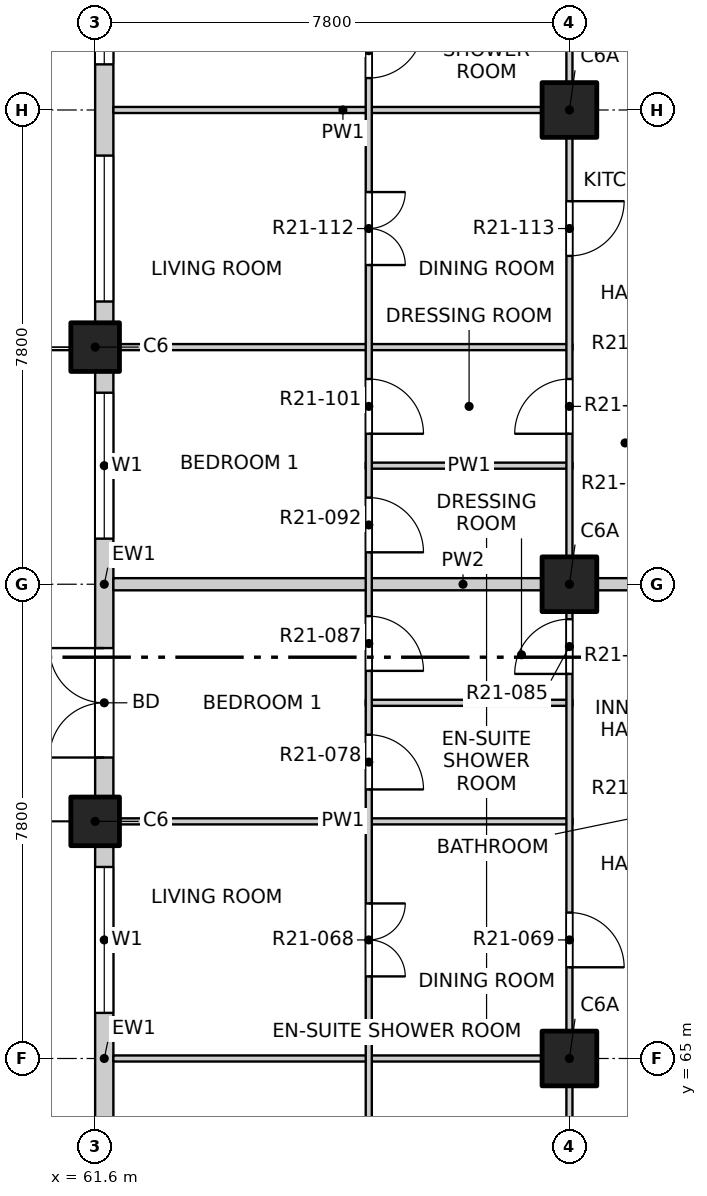
"""IFC4 building model, lengths in metres.
Left out: names, types, materials, properties, quantities, classifications, styles, units other than length and angle.
Written with IfcOpenShell. Run it as: python <this file> out.ifc"""

import sys

from ifc_helpers import new_model, si_unit, direction, frame, frame_2d, origin, origin_2d, place, context, subcontext, project, spatial, rectangle, extrude, element, fill, save


model = new_model("IFC4")
c1 = context("Model", 3, precision=1e-05, world=origin(), true_north=direction((0.0, 1.0)))
c2 = subcontext(c1, "Body", "Model", "MODEL_VIEW")
j1 = project(units=[si_unit("LENGTHUNIT", "METRE"), si_unit("PLANEANGLEUNIT", "RADIAN")], contexts=[c1])
p1 = place(None, origin())
s1 = spatial("IfcSite", under=j1, at=p1, CompositionType="ELEMENT")
p2 = place(p1, origin())
s2 = spatial("IfcBuilding", under=s1, at=p2, CompositionType="ELEMENT")
p3 = place(p2, frame((0.0, 0.0, 214.3)))
s3 = spatial("IfcBuildingStorey", under=s2, at=p3, CompositionType="ELEMENT", Elevation=214.3)
for number, where, z_axis, x_axis in (
    (1, (61.6, 68.9, -0.25), (0.0, 0.0, 1.0), (1.0, 0.0, 0.0)),
    (2, (61.6, 76.7, -0.25), (0.0, 0.0, 1.0), (1.0, 0.0, 0.0)),
):
    element("IfcColumn", number, at=place(p3, frame(where, z_axis=z_axis, x_axis=x_axis)), inside=s3, PredefinedType="COLUMN", context=c2, shape_type="SweptSolid", body=[
        extrude(rectangle(XDim=0.8, YDim=0.8, at=origin_2d()), origin(), (0.0, 0.0, 1.0), 3.4),
    ])
for number, where, z_axis, x_axis in (
    (3, (69.4, 65.0, -0.25), (0.0, 0.0, 1.0), (1.0, 0.0, 0.0)),
    (4, (69.4, 72.8, -0.25), (0.0, 0.0, 1.0), (1.0, 0.0, 0.0)),
    (5, (69.4, 80.6, -0.25), (0.0, 0.0, 1.0), (1.0, 0.0, 0.0)),
):
    element("IfcColumn", number, at=place(p3, frame(where, z_axis=z_axis, x_axis=x_axis)), inside=s3, PredefinedType="COLUMN", context=c2, shape_type="SweptSolid", body=[
        extrude(rectangle(XDim=0.9, YDim=0.9, at=origin_2d()), origin(), (0.0, 0.0, 1.0), 3.4),
    ])
p4 = place(p3, frame((61.75, 61.5, 0.0), z_axis=(0.0, 0.0, 1.0), x_axis=(0.0, 1.0, 0.0)))
e6 = element("IfcWall", 6, at=p4, inside=s3, PredefinedType="SOLIDWALL", context=c2, shape_type="SweptSolid", body=[
    extrude(rectangle(XDim=7.0, YDim=0.3, at=frame_2d((3.5, 0.0))), origin(), (0.0, 0.0, 1.0), 2.7),
])
p5 = place(p4, frame((0.65, 0.0, 0.0)))
e7 = element("IfcOpeningElement", 7, at=p5, cuts=e6, PredefinedType="OPENING", context=c2, shape_type="SweptSolid", body=[
    extrude(rectangle(XDim=1.8, YDim=2.4, at=frame_2d((0.9, 1.2))), frame((0.0, 0.16, 0.0), z_axis=(0.0, -1.0, 0.0), x_axis=(1.0, 0.0, 0.0)), (0.0, 0.0, 1.0), 0.32),
])
p6 = place(p4, frame((4.25, 0.0, 0.9)))
e8 = element("IfcOpeningElement", 8, at=p6, cuts=e6, PredefinedType="OPENING", context=c2, shape_type="SweptSolid", body=[
    extrude(rectangle(XDim=2.4, YDim=1.8, at=frame_2d((1.2, 0.9))), frame((0.0, 0.16, 0.0), z_axis=(0.0, -1.0, 0.0), x_axis=(1.0, 0.0, 0.0)), (0.0, 0.0, 1.0), 0.32),
])
p7 = place(p3, frame((61.75, 69.3, 0.0), z_axis=(0.0, 0.0, 1.0), x_axis=(0.0, 1.0, 0.0)))
e9 = element("IfcWall", 9, at=p7, inside=s3, PredefinedType="SOLIDWALL", context=c2, shape_type="SweptSolid", body=[
    extrude(rectangle(XDim=7.0, YDim=0.3, at=frame_2d((3.5, 0.0))), origin(), (0.0, 0.0, 1.0), 2.7),
])
p8 = place(p7, frame((0.65, 0.0, 0.0)))
e10 = element("IfcOpeningElement", 10, at=p8, cuts=e9, PredefinedType="OPENING", context=c2, shape_type="SweptSolid", body=[
    extrude(rectangle(XDim=1.8, YDim=2.4, at=frame_2d((0.9, 1.2))), frame((0.0, 0.16, 0.0), z_axis=(0.0, -1.0, 0.0), x_axis=(1.0, 0.0, 0.0)), (0.0, 0.0, 1.0), 0.32),
])
p9 = place(p7, frame((4.25, 0.0, 0.9)))
e11 = element("IfcOpeningElement", 11, at=p9, cuts=e9, PredefinedType="OPENING", context=c2, shape_type="SweptSolid", body=[
    extrude(rectangle(XDim=2.4, YDim=1.8, at=frame_2d((1.2, 0.9))), frame((0.0, 0.16, 0.0), z_axis=(0.0, -1.0, 0.0), x_axis=(1.0, 0.0, 0.0)), (0.0, 0.0, 1.0), 0.32),
])
p10 = place(p3, frame((61.75, 77.1, 0.0), z_axis=(0.0, 0.0, 1.0), x_axis=(0.0, 1.0, 0.0)))
e12 = element("IfcWall", 12, at=p10, inside=s3, PredefinedType="SOLIDWALL", context=c2, shape_type="SweptSolid", body=[
    extrude(rectangle(XDim=7.4, YDim=0.3, at=frame_2d((3.7, 0.0))), origin(), (0.0, 0.0, 1.0), 2.7),
])
p11 = place(p10, frame((0.35, 0.0, 0.9)))
e13 = element("IfcOpeningElement", 13, at=p11, cuts=e12, PredefinedType="OPENING", context=c2, shape_type="SweptSolid", body=[
    extrude(rectangle(XDim=2.4, YDim=1.8, at=frame_2d((1.2, 0.9))), frame((0.0, 0.16, 0.0), z_axis=(0.0, -1.0, 0.0), x_axis=(1.0, 0.0, 0.0)), (0.0, 0.0, 1.0), 0.32),
])
p12 = place(p10, frame((4.25, 0.0, 0.9)))
e14 = element("IfcOpeningElement", 14, at=p12, cuts=e12, PredefinedType="OPENING", context=c2, shape_type="SweptSolid", body=[
    extrude(rectangle(XDim=2.4, YDim=1.8, at=frame_2d((1.2, 0.9))), frame((0.0, 0.16, 0.0), z_axis=(0.0, -1.0, 0.0), x_axis=(1.0, 0.0, 0.0)), (0.0, 0.0, 1.0), 0.32),
])
p13 = place(p3, frame((61.9, 65.0, 0.0), z_axis=(0.0, 0.0, 1.0), x_axis=(1.0, 0.0, 0.0)))
e15 = element("IfcWall", 15, at=p13, inside=s3, PredefinedType="PARTITIONING", context=c2, shape_type="SweptSolid", body=[
    extrude(rectangle(XDim=7.55, YDim=0.1, at=frame_2d((3.775, 0.0))), origin(), (0.0, 0.0, 1.0), 3.15),
])
p14 = place(p3, frame((61.9, 68.9, 0.0), z_axis=(0.0, 0.0, 1.0), x_axis=(1.0, 0.0, 0.0)))
e16 = element("IfcWall", 16, at=p14, inside=s3, PredefinedType="PARTITIONING", context=c2, shape_type="SweptSolid", body=[
    extrude(rectangle(XDim=7.55, YDim=0.1, at=frame_2d((3.775, 0.0))), origin(), (0.0, 0.0, 1.0), 2.55),
])
p15 = place(p3, frame((66.05, 70.85, 0.0), z_axis=(0.0, 0.0, 1.0), x_axis=(1.0, 0.0, 0.0)))
e17 = element("IfcWall", 17, at=p15, inside=s3, PredefinedType="PARTITIONING", context=c2, shape_type="SweptSolid", body=[
    extrude(rectangle(XDim=3.4, YDim=0.1, at=frame_2d((1.7, 0.0))), origin(), (0.0, 0.0, 1.0), 3.15),
])
p16 = place(p3, frame((61.9, 72.8, 0.0), z_axis=(0.0, 0.0, 1.0), x_axis=(1.0, 0.0, 0.0)))
e18 = element("IfcWall", 18, at=p16, inside=s3, PredefinedType="PARTITIONING", context=c2, shape_type="SweptSolid", body=[
    extrude(rectangle(XDim=11.5, YDim=0.2, at=frame_2d((5.75, 0.0))), origin(), (0.0, 0.0, 1.0), 3.15),
])
p17 = place(p3, frame((66.05, 74.75, 0.0), z_axis=(0.0, 0.0, 1.0), x_axis=(1.0, 0.0, 0.0)))
e19 = element("IfcWall", 19, at=p17, inside=s3, PredefinedType="PARTITIONING", context=c2, shape_type="SweptSolid", body=[
    extrude(rectangle(XDim=3.4, YDim=0.1, at=frame_2d((1.7, 0.0))), origin(), (0.0, 0.0, 1.0), 3.15),
])
p18 = place(p3, frame((61.9, 76.7, 0.0), z_axis=(0.0, 0.0, 1.0), x_axis=(1.0, 0.0, 0.0)))
e20 = element("IfcWall", 20, at=p18, inside=s3, PredefinedType="PARTITIONING", context=c2, shape_type="SweptSolid", body=[
    extrude(rectangle(XDim=7.55, YDim=0.1, at=frame_2d((3.775, 0.0))), origin(), (0.0, 0.0, 1.0), 2.55),
])
p19 = place(p3, frame((61.9, 80.6, 0.0), z_axis=(0.0, 0.0, 1.0), x_axis=(1.0, 0.0, 0.0)))
e21 = element("IfcWall", 21, at=p19, inside=s3, PredefinedType="PARTITIONING", context=c2, shape_type="SweptSolid", body=[
    extrude(rectangle(XDim=7.55, YDim=0.1, at=frame_2d((3.775, 0.0))), origin(), (0.0, 0.0, 1.0), 3.15),
])
p20 = place(p3, frame((66.1, 61.2, 0.0), z_axis=(0.0, 0.0, 1.0), x_axis=(0.0, 1.0, 0.0)))
e22 = element("IfcWall", 22, at=p20, inside=s3, PredefinedType="PARTITIONING", context=c2, shape_type="SweptSolid", body=[
    extrude(rectangle(XDim=26.9, YDim=0.1, at=frame_2d((13.45, 0.0))), origin(), (0.0, 0.0, 1.0), 3.15),
])
p21 = place(p20, frame((1.25, 0.0, 0.0)))
e23 = element("IfcOpeningElement", 23, at=p21, cuts=e22, PredefinedType="OPENING", context=c2, shape_type="SweptSolid", body=[
    extrude(rectangle(XDim=1.2, YDim=2.1, at=frame_2d((0.6, 1.05))), frame((0.0, 0.06, 0.0), z_axis=(0.0, -1.0, 0.0), x_axis=(1.0, 0.0, 0.0)), (0.0, 0.0, 1.0), 0.12),
])
p22 = place(p20, frame((5.15, 0.0, 0.0)))
e24 = element("IfcOpeningElement", 24, at=p22, cuts=e22, PredefinedType="OPENING", context=c2, shape_type="SweptSolid", body=[
    extrude(rectangle(XDim=1.2, YDim=2.1, at=frame_2d((0.6, 1.05))), frame((0.0, 0.06, 0.0), z_axis=(0.0, -1.0, 0.0), x_axis=(1.0, 0.0, 0.0)), (0.0, 0.0, 1.0), 0.12),
])
p23 = place(p20, frame((8.225, 0.0, 0.0)))
e25 = element("IfcOpeningElement", 25, at=p23, cuts=e22, PredefinedType="OPENING", context=c2, shape_type="SweptSolid", body=[
    extrude(rectangle(XDim=0.9, YDim=2.1, at=frame_2d((0.45, 1.05))), frame((0.0, 0.06, 0.0), z_axis=(0.0, -1.0, 0.0), x_axis=(1.0, 0.0, 0.0)), (0.0, 0.0, 1.0), 0.12),
])
p24 = place(p20, frame((10.175, 0.0, 0.0)))
e26 = element("IfcOpeningElement", 26, at=p24, cuts=e22, PredefinedType="OPENING", context=c2, shape_type="SweptSolid", body=[
    extrude(rectangle(XDim=0.9, YDim=2.1, at=frame_2d((0.45, 1.05))), frame((0.0, 0.06, 0.0), z_axis=(0.0, -1.0, 0.0), x_axis=(1.0, 0.0, 0.0)), (0.0, 0.0, 1.0), 0.12),
])
p25 = place(p20, frame((12.125, 0.0, 0.0)))
e27 = element("IfcOpeningElement", 27, at=p25, cuts=e22, PredefinedType="OPENING", context=c2, shape_type="SweptSolid", body=[
    extrude(rectangle(XDim=0.9, YDim=2.1, at=frame_2d((0.45, 1.05))), frame((0.0, 0.06, 0.0), z_axis=(0.0, -1.0, 0.0), x_axis=(1.0, 0.0, 0.0)), (0.0, 0.0, 1.0), 0.12),
])
p26 = place(p20, frame((14.075, 0.0, 0.0)))
e28 = element("IfcOpeningElement", 28, at=p26, cuts=e22, PredefinedType="OPENING", context=c2, shape_type="SweptSolid", body=[
    extrude(rectangle(XDim=0.9, YDim=2.1, at=frame_2d((0.45, 1.05))), frame((0.0, 0.06, 0.0), z_axis=(0.0, -1.0, 0.0), x_axis=(1.0, 0.0, 0.0)), (0.0, 0.0, 1.0), 0.12),
])
p27 = place(p20, frame((16.85, 0.0, 0.0)))
e29 = element("IfcOpeningElement", 29, at=p27, cuts=e22, PredefinedType="OPENING", context=c2, shape_type="SweptSolid", body=[
    extrude(rectangle(XDim=1.2, YDim=2.1, at=frame_2d((0.6, 1.05))), frame((0.0, 0.06, 0.0), z_axis=(0.0, -1.0, 0.0), x_axis=(1.0, 0.0, 0.0)), (0.0, 0.0, 1.0), 0.12),
])
p28 = place(p20, frame((19.925, 0.0, 0.0)))
e30 = element("IfcOpeningElement", 30, at=p28, cuts=e22, PredefinedType="OPENING", context=c2, shape_type="SweptSolid", body=[
    extrude(rectangle(XDim=0.9, YDim=2.1, at=frame_2d((0.45, 1.05))), frame((0.0, 0.06, 0.0), z_axis=(0.0, -1.0, 0.0), x_axis=(1.0, 0.0, 0.0)), (0.0, 0.0, 1.0), 0.12),
])
p29 = place(p20, frame((21.875, 0.0, 0.0)))
e31 = element("IfcOpeningElement", 31, at=p29, cuts=e22, PredefinedType="OPENING", context=c2, shape_type="SweptSolid", body=[
    extrude(rectangle(XDim=0.9, YDim=2.1, at=frame_2d((0.45, 1.05))), frame((0.0, 0.06, 0.0), z_axis=(0.0, -1.0, 0.0), x_axis=(1.0, 0.0, 0.0)), (0.0, 0.0, 1.0), 0.12),
])
p30 = place(p20, frame((24.65, 0.0, 0.0)))
e32 = element("IfcOpeningElement", 32, at=p30, cuts=e22, PredefinedType="OPENING", context=c2, shape_type="SweptSolid", body=[
    extrude(rectangle(XDim=1.2, YDim=2.1, at=frame_2d((0.6, 1.05))), frame((0.0, 0.06, 0.0), z_axis=(0.0, -1.0, 0.0), x_axis=(1.0, 0.0, 0.0)), (0.0, 0.0, 1.0), 0.12),
])
p31 = place(p3, frame((69.4, 41.9, 0.0), z_axis=(0.0, 0.0, 1.0), x_axis=(0.0, 1.0, 0.0)))
e33 = element("IfcWall", 33, at=p31, inside=s3, PredefinedType="PARTITIONING", context=c2, shape_type="SweptSolid", body=[
    extrude(rectangle(XDim=46.2, YDim=0.1, at=frame_2d((23.1, 0.0))), origin(), (0.0, 0.0, 1.0), 3.15),
])
p32 = place(p31, frame((1.2, 0.0, 0.0)))
e34 = element("IfcOpeningElement", 34, at=p32, cuts=e33, PredefinedType="OPENING", context=c2, shape_type="SweptSolid", body=[
    extrude(rectangle(XDim=0.9, YDim=2.1, at=frame_2d((0.45, 1.05))), frame((0.0, 0.06, 0.0), z_axis=(0.0, -1.0, 0.0), x_axis=(1.0, 0.0, 0.0)), (0.0, 0.0, 1.0), 0.12),
])
p33 = place(p31, frame((6.025, 0.0, 0.0)))
e35 = element("IfcOpeningElement", 35, at=p33, cuts=e33, PredefinedType="OPENING", context=c2, shape_type="SweptSolid", body=[
    extrude(rectangle(XDim=0.9, YDim=2.1, at=frame_2d((0.45, 1.05))), frame((0.0, 0.06, 0.0), z_axis=(0.0, -1.0, 0.0), x_axis=(1.0, 0.0, 0.0)), (0.0, 0.0, 1.0), 0.12),
])
p34 = place(p31, frame((9.0, 0.0, 0.0)))
e36 = element("IfcOpeningElement", 36, at=p34, cuts=e33, PredefinedType="OPENING", context=c2, shape_type="SweptSolid", body=[
    extrude(rectangle(XDim=0.9, YDim=2.1, at=frame_2d((0.45, 1.05))), frame((0.0, 0.06, 0.0), z_axis=(0.0, -1.0, 0.0), x_axis=(1.0, 0.0, 0.0)), (0.0, 0.0, 1.0), 0.12),
])
p35 = place(p31, frame((12.9, 0.0, 0.0)))
e37 = element("IfcOpeningElement", 37, at=p35, cuts=e33, PredefinedType="OPENING", context=c2, shape_type="SweptSolid", body=[
    extrude(rectangle(XDim=0.9, YDim=2.1, at=frame_2d((0.45, 1.05))), frame((0.0, 0.06, 0.0), z_axis=(0.0, -1.0, 0.0), x_axis=(1.0, 0.0, 0.0)), (0.0, 0.0, 1.0), 0.12),
])
p36 = place(p31, frame((17.775, 0.0, 0.0)))
e38 = element("IfcOpeningElement", 38, at=p36, cuts=e33, PredefinedType="OPENING", context=c2, shape_type="SweptSolid", body=[
    extrude(rectangle(XDim=0.9, YDim=2.1, at=frame_2d((0.45, 1.05))), frame((0.0, 0.06, 0.0), z_axis=(0.0, -1.0, 0.0), x_axis=(1.0, 0.0, 0.0)), (0.0, 0.0, 1.0), 0.12),
])
p37 = place(p31, frame((20.7, 0.0, 0.0)))
e39 = element("IfcOpeningElement", 39, at=p37, cuts=e33, PredefinedType="OPENING", context=c2, shape_type="SweptSolid", body=[
    extrude(rectangle(XDim=0.9, YDim=2.1, at=frame_2d((0.45, 1.05))), frame((0.0, 0.06, 0.0), z_axis=(0.0, -1.0, 0.0), x_axis=(1.0, 0.0, 0.0)), (0.0, 0.0, 1.0), 0.12),
])
p38 = place(p31, frame((24.6, 0.0, 0.0)))
e40 = element("IfcOpeningElement", 40, at=p38, cuts=e33, PredefinedType="OPENING", context=c2, shape_type="SweptSolid", body=[
    extrude(rectangle(XDim=0.9, YDim=2.1, at=frame_2d((0.45, 1.05))), frame((0.0, 0.06, 0.0), z_axis=(0.0, -1.0, 0.0), x_axis=(1.0, 0.0, 0.0)), (0.0, 0.0, 1.0), 0.12),
])
p39 = place(p31, frame((29.425, 0.0, 0.0)))
e41 = element("IfcOpeningElement", 41, at=p39, cuts=e33, PredefinedType="OPENING", context=c2, shape_type="SweptSolid", body=[
    extrude(rectangle(XDim=0.9, YDim=2.1, at=frame_2d((0.45, 1.05))), frame((0.0, 0.06, 0.0), z_axis=(0.0, -1.0, 0.0), x_axis=(1.0, 0.0, 0.0)), (0.0, 0.0, 1.0), 0.12),
])
p40 = place(p31, frame((33.375, 0.0, 0.0)))
e42 = element("IfcOpeningElement", 42, at=p40, cuts=e33, PredefinedType="OPENING", context=c2, shape_type="SweptSolid", body=[
    extrude(rectangle(XDim=0.9, YDim=2.1, at=frame_2d((0.45, 1.05))), frame((0.0, 0.06, 0.0), z_axis=(0.0, -1.0, 0.0), x_axis=(1.0, 0.0, 0.0)), (0.0, 0.0, 1.0), 0.12),
])
p41 = place(p31, frame((36.3, 0.0, 0.0)))
e43 = element("IfcOpeningElement", 43, at=p41, cuts=e33, PredefinedType="OPENING", context=c2, shape_type="SweptSolid", body=[
    extrude(rectangle(XDim=0.9, YDim=2.1, at=frame_2d((0.45, 1.05))), frame((0.0, 0.06, 0.0), z_axis=(0.0, -1.0, 0.0), x_axis=(1.0, 0.0, 0.0)), (0.0, 0.0, 1.0), 0.12),
])
p42 = place(p31, frame((41.175, 0.0, 0.0)))
e44 = element("IfcOpeningElement", 44, at=p42, cuts=e33, PredefinedType="OPENING", context=c2, shape_type="SweptSolid", body=[
    extrude(rectangle(XDim=0.9, YDim=2.1, at=frame_2d((0.45, 1.05))), frame((0.0, 0.06, 0.0), z_axis=(0.0, -1.0, 0.0), x_axis=(1.0, 0.0, 0.0)), (0.0, 0.0, 1.0), 0.12),
])
p43 = place(p31, frame((44.1, 0.0, 0.0)))
e45 = element("IfcOpeningElement", 45, at=p43, cuts=e33, PredefinedType="OPENING", context=c2, shape_type="SweptSolid", body=[
    extrude(rectangle(XDim=0.9, YDim=2.1, at=frame_2d((0.45, 1.05))), frame((0.0, 0.06, 0.0), z_axis=(0.0, -1.0, 0.0), x_axis=(1.0, 0.0, 0.0)), (0.0, 0.0, 1.0), 0.12),
])
p44 = place(p6, origin())
e46 = element("IfcWindow", 46, at=p44, inside=s3, PartitioningType="DOUBLE_PANEL_VERTICAL", PredefinedType="WINDOW", context=c2, shape_type="SweptSolid", body=[
    extrude(rectangle(XDim=2.4, YDim=1.8, at=frame_2d((1.2, 0.9))), frame((0.0, 0.03, 0.0), z_axis=(0.0, -1.0, 0.0), x_axis=(1.0, 0.0, 0.0)), (0.0, 0.0, 1.0), 0.06),
])
fill(e8, e46)
p45 = place(p8, origin())
e47 = element("IfcDoor", 47, at=p45, inside=s3, OperationType="DOUBLE_DOOR_SINGLE_SWING", PredefinedType="DOOR", context=c2, shape_type="SweptSolid", body=[
    extrude(rectangle(XDim=1.8, YDim=2.4, at=frame_2d((0.9, 1.2))), frame((0.0, 0.025, 0.0), z_axis=(0.0, -1.0, 0.0), x_axis=(1.0, 0.0, 0.0)), (0.0, 0.0, 1.0), 0.05),
])
fill(e10, e47)
p46 = place(p9, origin())
e48 = element("IfcWindow", 48, at=p46, inside=s3, PartitioningType="DOUBLE_PANEL_VERTICAL", PredefinedType="WINDOW", context=c2, shape_type="SweptSolid", body=[
    extrude(rectangle(XDim=2.4, YDim=1.8, at=frame_2d((1.2, 0.9))), frame((0.0, 0.03, 0.0), z_axis=(0.0, -1.0, 0.0), x_axis=(1.0, 0.0, 0.0)), (0.0, 0.0, 1.0), 0.06),
])
fill(e11, e48)
p47 = place(p11, origin())
e49 = element("IfcWindow", 49, at=p47, inside=s3, PartitioningType="DOUBLE_PANEL_VERTICAL", PredefinedType="WINDOW", context=c2, shape_type="SweptSolid", body=[
    extrude(rectangle(XDim=2.4, YDim=1.8, at=frame_2d((1.2, 0.9))), frame((0.0, 0.03, 0.0), z_axis=(0.0, -1.0, 0.0), x_axis=(1.0, 0.0, 0.0)), (0.0, 0.0, 1.0), 0.06),
])
fill(e13, e49)
p48 = place(p12, origin())
e50 = element("IfcWindow", 50, at=p48, inside=s3, PartitioningType="DOUBLE_PANEL_VERTICAL", PredefinedType="WINDOW", context=c2, shape_type="SweptSolid", body=[
    extrude(rectangle(XDim=2.4, YDim=1.8, at=frame_2d((1.2, 0.9))), frame((0.0, 0.03, 0.0), z_axis=(0.0, -1.0, 0.0), x_axis=(1.0, 0.0, 0.0)), (0.0, 0.0, 1.0), 0.06),
])
fill(e14, e50)
p49 = place(p22, origin())
e51 = element("IfcDoor", 51, at=p49, inside=s3, OperationType="DOUBLE_DOOR_SINGLE_SWING", PredefinedType="DOOR", context=c2, shape_type="SweptSolid", body=[
    extrude(rectangle(XDim=1.2, YDim=2.1, at=frame_2d((0.6, 1.05))), frame((0.0, 0.025, 0.0), z_axis=(0.0, -1.0, 0.0), x_axis=(1.0, 0.0, 0.0)), (0.0, 0.0, 1.0), 0.05),
])
fill(e24, e51)
p50 = place(p38, origin())
e52 = element("IfcDoor", 52, at=p50, inside=s3, OperationType="SINGLE_SWING_RIGHT", PredefinedType="DOOR", context=c2, shape_type="SweptSolid", body=[
    extrude(rectangle(XDim=0.9, YDim=2.1, at=frame_2d((0.45, 1.05))), frame((0.0, 0.025, 0.0), z_axis=(0.0, -1.0, 0.0), x_axis=(1.0, 0.0, 0.0)), (0.0, 0.0, 1.0), 0.05),
])
fill(e40, e52)
p51 = place(p23, origin())
e53 = element("IfcDoor", 53, at=p51, inside=s3, OperationType="SINGLE_SWING_RIGHT", PredefinedType="DOOR", context=c2, shape_type="SweptSolid", body=[
    extrude(rectangle(XDim=0.9, YDim=2.1, at=frame_2d((0.45, 1.05))), frame((0.0, 0.025, 0.0), z_axis=(0.0, -1.0, 0.0), x_axis=(1.0, 0.0, 0.0)), (0.0, 0.0, 1.0), 0.05),
])
fill(e25, e53)
p52 = place(p39, origin())
e54 = element("IfcDoor", 54, at=p52, inside=s3, OperationType="SINGLE_SWING_LEFT", PredefinedType="DOOR", context=c2, shape_type="SweptSolid", body=[
    extrude(rectangle(XDim=0.9, YDim=2.1, at=frame_2d((0.45, 1.05))), frame((0.0, 0.025, 0.0), z_axis=(0.0, -1.0, 0.0), x_axis=(1.0, 0.0, 0.0)), (0.0, 0.0, 1.0), 0.05),
])
fill(e41, e54)
p53 = place(p24, origin())
e55 = element("IfcDoor", 55, at=p53, inside=s3, OperationType="SINGLE_SWING_RIGHT", PredefinedType="DOOR", context=c2, shape_type="SweptSolid", body=[
    extrude(rectangle(XDim=0.9, YDim=2.1, at=frame_2d((0.45, 1.05))), frame((0.0, 0.025, 0.0), z_axis=(0.0, -1.0, 0.0), x_axis=(1.0, 0.0, 0.0)), (0.0, 0.0, 1.0), 0.05),
])
fill(e26, e55)
p54 = place(p25, origin())
e56 = element("IfcDoor", 56, at=p54, inside=s3, OperationType="SINGLE_SWING_RIGHT", PredefinedType="DOOR", context=c2, shape_type="SweptSolid", body=[
    extrude(rectangle(XDim=0.9, YDim=2.1, at=frame_2d((0.45, 1.05))), frame((0.0, 0.025, 0.0), z_axis=(0.0, -1.0, 0.0), x_axis=(1.0, 0.0, 0.0)), (0.0, 0.0, 1.0), 0.05),
])
fill(e27, e56)
p55 = place(p26, origin())
e57 = element("IfcDoor", 57, at=p55, inside=s3, OperationType="SINGLE_SWING_RIGHT", PredefinedType="DOOR", context=c2, shape_type="SweptSolid", body=[
    extrude(rectangle(XDim=0.9, YDim=2.1, at=frame_2d((0.45, 1.05))), frame((0.0, 0.025, 0.0), z_axis=(0.0, -1.0, 0.0), x_axis=(1.0, 0.0, 0.0)), (0.0, 0.0, 1.0), 0.05),
])
fill(e28, e57)
p56 = place(p40, origin())
e58 = element("IfcDoor", 58, at=p56, inside=s3, OperationType="SINGLE_SWING_LEFT", PredefinedType="DOOR", context=c2, shape_type="SweptSolid", body=[
    extrude(rectangle(XDim=0.9, YDim=2.1, at=frame_2d((0.45, 1.05))), frame((0.0, 0.025, 0.0), z_axis=(0.0, -1.0, 0.0), x_axis=(1.0, 0.0, 0.0)), (0.0, 0.0, 1.0), 0.05),
])
fill(e42, e58)
p57 = place(p27, origin())
e59 = element("IfcDoor", 59, at=p57, inside=s3, OperationType="DOUBLE_DOOR_SINGLE_SWING", PredefinedType="DOOR", context=c2, shape_type="SweptSolid", body=[
    extrude(rectangle(XDim=1.2, YDim=2.1, at=frame_2d((0.6, 1.05))), frame((0.0, 0.025, 0.0), z_axis=(0.0, -1.0, 0.0), x_axis=(1.0, 0.0, 0.0)), (0.0, 0.0, 1.0), 0.05),
])
fill(e29, e59)
p58 = place(p41, origin())
e60 = element("IfcDoor", 60, at=p58, inside=s3, OperationType="SINGLE_SWING_LEFT", PredefinedType="DOOR", context=c2, shape_type="SweptSolid", body=[
    extrude(rectangle(XDim=0.9, YDim=2.1, at=frame_2d((0.45, 1.05))), frame((0.0, 0.025, 0.0), z_axis=(0.0, -1.0, 0.0), x_axis=(1.0, 0.0, 0.0)), (0.0, 0.0, 1.0), 0.05),
])
fill(e43, e60)
p59 = place(p28, origin())
e61 = element("IfcDoor", 61, at=p59, inside=s3, OperationType="SINGLE_SWING_LEFT", PredefinedType="DOOR", context=c2, shape_type="SweptSolid", body=[
    extrude(rectangle(XDim=0.9, YDim=2.1, at=frame_2d((0.45, 1.05))), frame((0.0, 0.025, 0.0), z_axis=(0.0, -1.0, 0.0), x_axis=(1.0, 0.0, 0.0)), (0.0, 0.0, 1.0), 0.05),
])
fill(e30, e61)
save(model, sys.argv[1])
